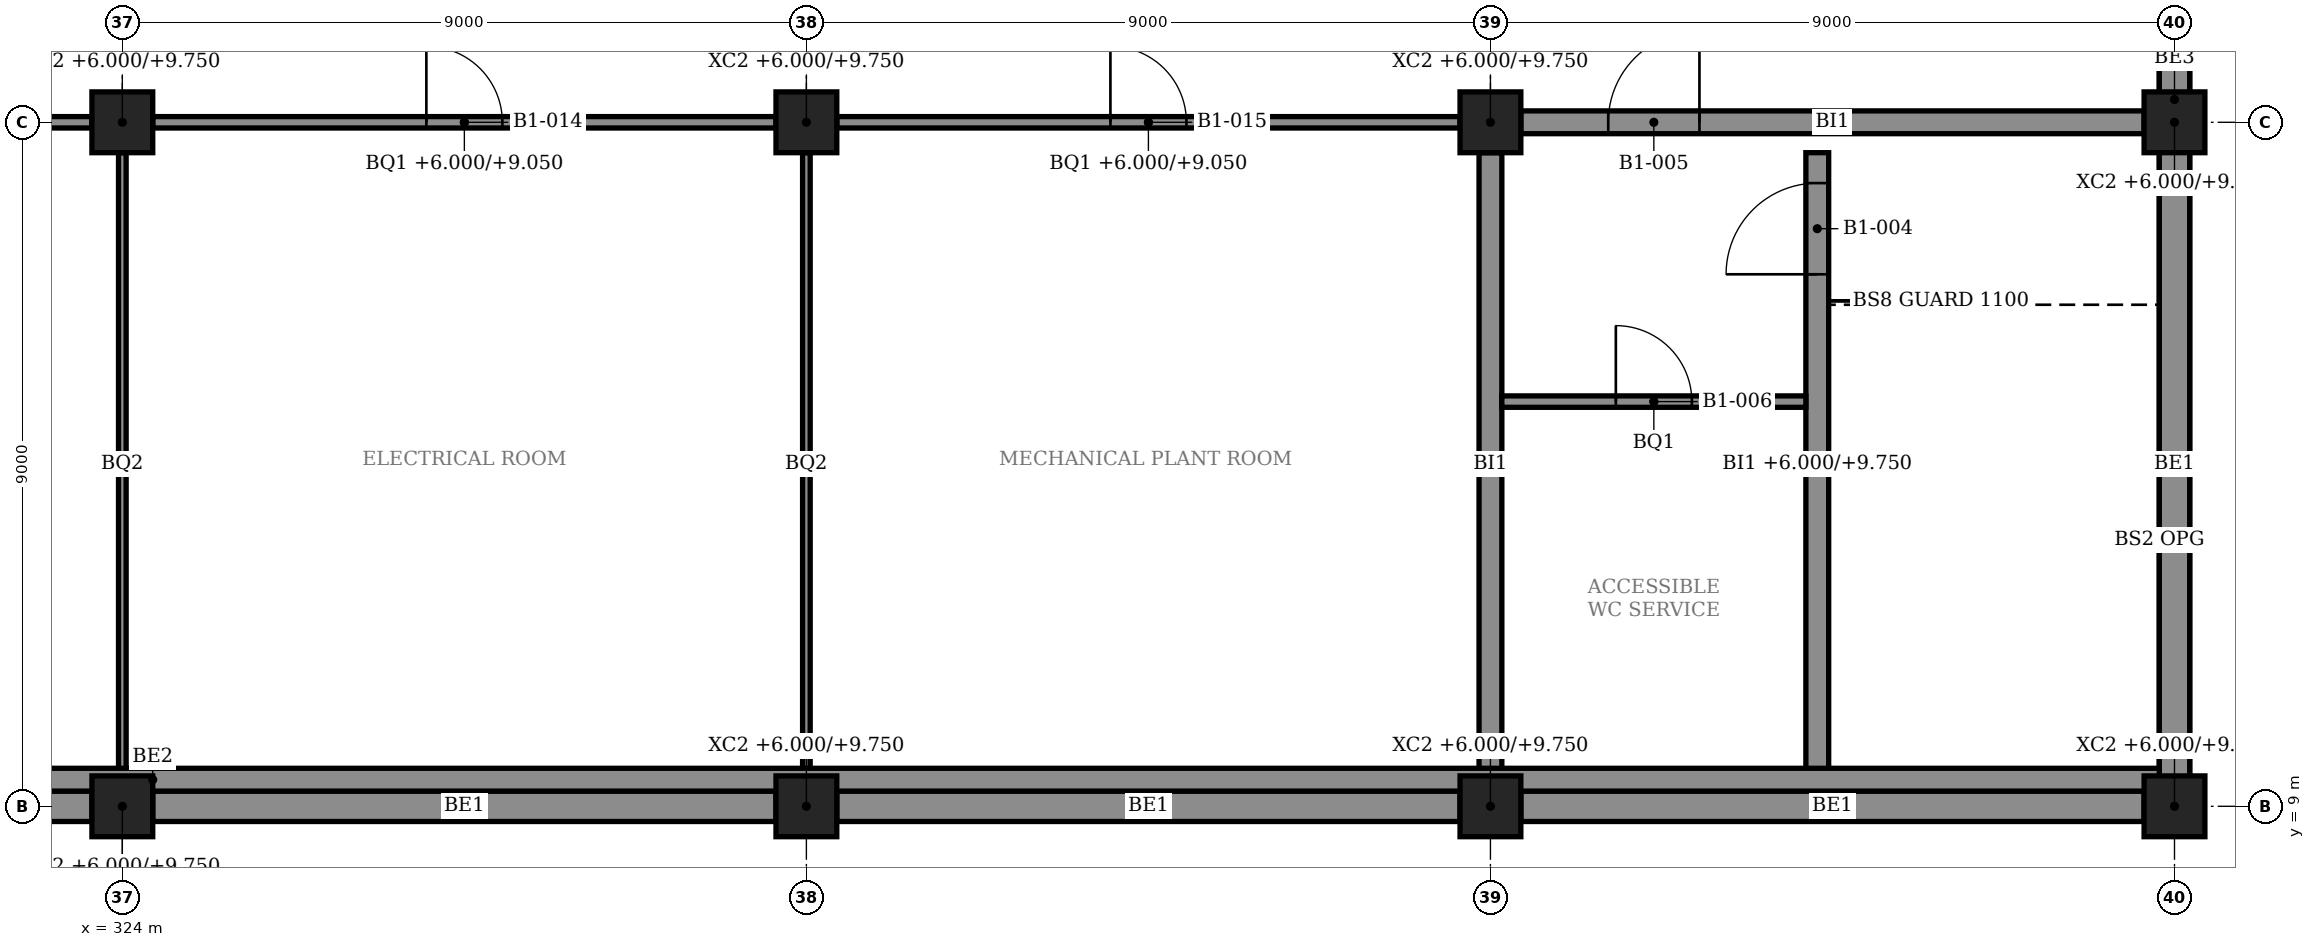
"""IFC4 building model, lengths in metres.
Left out: names, types, materials, properties, quantities, classifications, styles, units other than length and angle.
Written with IfcOpenShell. Run it as: python <this file> out.ifc"""

import sys

from ifc_helpers import new_model, si_unit, direction, frame, frame_2d, origin, origin_2d, place, context, subcontext, project, spatial, rectangle, extrude, element, fill, save


model = new_model("IFC4")
c1 = context("Model", 3, precision=1e-05, world=origin(), true_north=direction((0.0, 1.0)))
c2 = subcontext(c1, "Body", "Model", "MODEL_VIEW")
j1 = project(units=[si_unit("LENGTHUNIT", "METRE"), si_unit("PLANEANGLEUNIT", "RADIAN")], contexts=[c1])
p1 = place(None, origin())
s1 = spatial("IfcSite", under=j1, at=p1, CompositionType="ELEMENT")
p2 = place(p1, origin())
s2 = spatial("IfcBuilding", under=s1, at=p2, CompositionType="ELEMENT")
p3 = place(p2, frame((0.0, 0.0, 6.0)))
s3 = spatial("IfcBuildingStorey", under=s2, at=p3, CompositionType="ELEMENT", Elevation=6.0)
for number, where, z_axis, x_axis in (
    (1, (324.0, 9.0, 0.0), (0.0, 0.0, 1.0), (1.0, 0.0, 0.0)),
    (2, (333.0, 9.0, 0.0), (0.0, 0.0, 1.0), (1.0, 0.0, 0.0)),
    (3, (342.0, 9.0, 0.0), (0.0, 0.0, 1.0), (1.0, 0.0, 0.0)),
    (4, (351.0, 9.0, 0.0), (0.0, 0.0, 1.0), (1.0, 0.0, 0.0)),
    (5, (324.0, 18.0, 0.0), (0.0, 0.0, 1.0), (1.0, 0.0, 0.0)),
    (6, (333.0, 18.0, 0.0), (0.0, 0.0, 1.0), (1.0, 0.0, 0.0)),
    (7, (342.0, 18.0, 0.0), (0.0, 0.0, 1.0), (1.0, 0.0, 0.0)),
    (8, (351.0, 18.0, 0.0), (0.0, 0.0, 1.0), (1.0, 0.0, 0.0)),
):
    element("IfcColumn", number, at=place(p3, frame(where, z_axis=z_axis, x_axis=x_axis)), inside=s3, PredefinedType="COLUMN", context=c2, shape_type="SweptSolid", body=[
        extrude(rectangle(XDim=0.8, YDim=0.8, at=origin_2d()), origin(), (0.0, 0.0, 1.0), 3.75),
    ])
p4 = place(p3, frame((351.0, 9.4, 0.0), z_axis=(0.0, 0.0, 1.0), x_axis=(0.0, 1.0, 0.0)))
e9 = element("IfcWall", 9, at=p4, inside=s3, PredefinedType="STANDARD", context=c2, shape_type="SweptSolid", body=[
    extrude(rectangle(XDim=8.2, YDim=0.4, at=frame_2d((4.1, 0.0))), origin(), (0.0, 0.0, 1.0), 3.05),
])
p5 = place(p3, frame((351.0, 18.4, 0.0), z_axis=(0.0, 0.0, 1.0), x_axis=(0.0, 1.0, 0.0)))
e10 = element("IfcWall", 10, at=p5, inside=s3, PredefinedType="STANDARD", context=c2, shape_type="SweptSolid", body=[
    extrude(rectangle(XDim=8.2, YDim=0.4, at=frame_2d((4.1, 0.0))), origin(), (0.0, 0.0, 1.0), 3.05),
])
p6 = place(p5, frame((1.05, 0.0, 0.9)))
e11 = element("IfcOpeningElement", 11, at=p6, cuts=e10, PredefinedType="OPENING", context=c2, shape_type="SweptSolid", body=[
    extrude(rectangle(XDim=1.5, YDim=1.8, at=frame_2d((0.75, 0.9))), frame((0.0, 0.21, 0.0), z_axis=(0.0, -1.0, 0.0), x_axis=(1.0, 0.0, 0.0)), (0.0, 0.0, 1.0), 0.42),
])
p7 = place(p5, frame((3.55, 0.0, 0.9)))
e12 = element("IfcOpeningElement", 12, at=p7, cuts=e10, PredefinedType="OPENING", context=c2, shape_type="SweptSolid", body=[
    extrude(rectangle(XDim=1.5, YDim=1.8, at=frame_2d((0.75, 0.9))), frame((0.0, 0.21, 0.0), z_axis=(0.0, -1.0, 0.0), x_axis=(1.0, 0.0, 0.0)), (0.0, 0.0, 1.0), 0.42),
])
p8 = place(p5, frame((6.05, 0.0, 0.9)))
e13 = element("IfcOpeningElement", 13, at=p8, cuts=e10, PredefinedType="OPENING", context=c2, shape_type="SweptSolid", body=[
    extrude(rectangle(XDim=1.5, YDim=1.8, at=frame_2d((0.75, 0.9))), frame((0.0, 0.21, 0.0), z_axis=(0.0, -1.0, 0.0), x_axis=(1.0, 0.0, 0.0)), (0.0, 0.0, 1.0), 0.42),
])
for number, where, z_axis, x_axis in (
    (14, (315.4, 9.0, 0.0), (0.0, 0.0, 1.0), (1.0, 0.0, 0.0)),
    (15, (324.4, 9.0, 0.0), (0.0, 0.0, 1.0), (1.0, 0.0, 0.0)),
    (16, (333.4, 9.0, 0.0), (0.0, 0.0, 1.0), (1.0, 0.0, 0.0)),
    (17, (342.4, 9.0, 0.0), (0.0, 0.0, 1.0), (1.0, 0.0, 0.0)),
):
    element("IfcWall", number, at=place(p3, frame(where, z_axis=z_axis, x_axis=x_axis)), inside=s3, PredefinedType="STANDARD", context=c2, shape_type="SweptSolid", body=[
        extrude(rectangle(XDim=8.2, YDim=0.4, at=frame_2d((4.1, 0.0))), origin(), (0.0, 0.0, 1.0), 3.05),
    ])
p9 = place(p3, frame((351.0, 9.2, 4.0), z_axis=(0.0, 0.0, 1.0), x_axis=(0.0, 1.0, 0.0)))
e18 = element("IfcWall", 18, at=p9, inside=s3, PredefinedType="PARAPET", context=c2, shape_type="SweptSolid", body=[
    extrude(rectangle(XDim=18.2, YDim=0.4, at=frame_2d((9.1, 0.0))), origin(), (0.0, 0.0, 1.0), 1.121),
])
p10 = place(p3, frame((288.2, 9.35, 4.0), z_axis=(0.0, 0.0, 1.0), x_axis=(1.0, 0.0, 0.0)))
e19 = element("IfcWall", 19, at=p10, inside=s3, PredefinedType="PARAPET", context=c2, shape_type="SweptSolid", body=[
    extrude(rectangle(XDim=62.6, YDim=0.3, at=frame_2d((31.3, 0.0))), origin(), (0.0, 0.0, 1.0), 1.121),
])
p11 = place(p3, frame((346.3, 9.4, 0.0), z_axis=(0.0, 0.0, 1.0), x_axis=(0.0, 1.0, 0.0)))
e20 = element("IfcWall", 20, at=p11, inside=s3, PredefinedType="STANDARD", context=c2, shape_type="SweptSolid", body=[
    extrude(rectangle(XDim=8.2, YDim=0.3, at=frame_2d((4.1, 0.0))), origin(), (0.0, 0.0, 1.0), 3.75),
])
p12 = place(p11, frame((6.6, 0.0, 0.0)))
e21 = element("IfcOpeningElement", 21, at=p12, cuts=e20, PredefinedType="OPENING", context=c2, shape_type="SweptSolid", body=[
    extrude(rectangle(XDim=1.2, YDim=2.4, at=frame_2d((0.6, 1.2))), frame((0.0, 0.16, 0.0), z_axis=(0.0, -1.0, 0.0), x_axis=(1.0, 0.0, 0.0)), (0.0, 0.0, 1.0), 0.32),
])
p13 = place(p3, frame((342.0, 9.4, 0.0), z_axis=(0.0, 0.0, 1.0), x_axis=(0.0, 1.0, 0.0)))
e22 = element("IfcWall", 22, at=p13, inside=s3, PredefinedType="STANDARD", context=c2, shape_type="SweptSolid", body=[
    extrude(rectangle(XDim=8.2, YDim=0.3, at=frame_2d((4.1, 0.0))), origin(), (0.0, 0.0, 1.0), 3.05),
])
p14 = place(p3, frame((342.4, 18.0, 0.0), z_axis=(0.0, 0.0, 1.0), x_axis=(1.0, 0.0, 0.0)))
e23 = element("IfcWall", 23, at=p14, inside=s3, PredefinedType="STANDARD", context=c2, shape_type="SweptSolid", body=[
    extrude(rectangle(XDim=8.2, YDim=0.3, at=frame_2d((4.1, 0.0))), origin(), (0.0, 0.0, 1.0), 3.05),
])
p15 = place(p14, frame((1.15, 0.0, 0.0)))
e24 = element("IfcOpeningElement", 24, at=p15, cuts=e23, PredefinedType="OPENING", context=c2, shape_type="SweptSolid", body=[
    extrude(rectangle(XDim=1.2, YDim=2.4, at=frame_2d((0.6, 1.2))), frame((0.0, 0.16, 0.0), z_axis=(0.0, -1.0, 0.0), x_axis=(1.0, 0.0, 0.0)), (0.0, 0.0, 1.0), 0.32),
])
p16 = place(p3, frame((342.15, 14.325, 0.0), z_axis=(0.0, 0.0, 1.0), x_axis=(1.0, 0.0, 0.0)))
e25 = element("IfcWall", 25, at=p16, inside=s3, PredefinedType="PARTITIONING", context=c2, shape_type="SweptSolid", body=[
    extrude(rectangle(XDim=4.0, YDim=0.15, at=frame_2d((2.0, 0.0))), origin(), (0.0, 0.0, 1.0), 3.75),
])
p17 = place(p16, frame((1.5, 0.0, 0.0)))
e26 = element("IfcOpeningElement", 26, at=p17, cuts=e25, PredefinedType="OPENING", context=c2, shape_type="SweptSolid", body=[
    extrude(rectangle(XDim=1.0, YDim=2.4, at=frame_2d((0.5, 1.2))), frame((0.0, 0.085, 0.0), z_axis=(0.0, -1.0, 0.0), x_axis=(1.0, 0.0, 0.0)), (0.0, 0.0, 1.0), 0.17),
])
p18 = place(p3, frame((315.4, 18.0, 0.0), z_axis=(0.0, 0.0, 1.0), x_axis=(1.0, 0.0, 0.0)))
e27 = element("IfcWall", 27, at=p18, inside=s3, PredefinedType="PARTITIONING", context=c2, shape_type="SweptSolid", body=[
    extrude(rectangle(XDim=8.2, YDim=0.15, at=frame_2d((4.1, 0.0))), origin(), (0.0, 0.0, 1.0), 3.05),
])
p19 = place(p3, frame((324.4, 18.0, 0.0), z_axis=(0.0, 0.0, 1.0), x_axis=(1.0, 0.0, 0.0)))
e28 = element("IfcWall", 28, at=p19, inside=s3, PredefinedType="PARTITIONING", context=c2, shape_type="SweptSolid", body=[
    extrude(rectangle(XDim=8.2, YDim=0.15, at=frame_2d((4.1, 0.0))), origin(), (0.0, 0.0, 1.0), 3.05),
])
p20 = place(p19, frame((3.6, 0.0, 0.0)))
e29 = element("IfcOpeningElement", 29, at=p20, cuts=e28, PredefinedType="OPENING", context=c2, shape_type="SweptSolid", body=[
    extrude(rectangle(XDim=1.0, YDim=2.4, at=frame_2d((0.5, 1.2))), frame((0.0, 0.085, 0.0), z_axis=(0.0, -1.0, 0.0), x_axis=(1.0, 0.0, 0.0)), (0.0, 0.0, 1.0), 0.17),
])
p21 = place(p3, frame((333.4, 18.0, 0.0), z_axis=(0.0, 0.0, 1.0), x_axis=(1.0, 0.0, 0.0)))
e30 = element("IfcWall", 30, at=p21, inside=s3, PredefinedType="PARTITIONING", context=c2, shape_type="SweptSolid", body=[
    extrude(rectangle(XDim=8.2, YDim=0.15, at=frame_2d((4.1, 0.0))), origin(), (0.0, 0.0, 1.0), 3.05),
])
p22 = place(p21, frame((3.6, 0.0, 0.0)))
e31 = element("IfcOpeningElement", 31, at=p22, cuts=e30, PredefinedType="OPENING", context=c2, shape_type="SweptSolid", body=[
    extrude(rectangle(XDim=1.0, YDim=2.4, at=frame_2d((0.5, 1.2))), frame((0.0, 0.085, 0.0), z_axis=(0.0, -1.0, 0.0), x_axis=(1.0, 0.0, 0.0)), (0.0, 0.0, 1.0), 0.17),
])
for number, where, z_axis, x_axis in (
    (32, (324.0, 9.4, 0.0), (0.0, 0.0, 1.0), (0.0, 1.0, 0.0)),
    (33, (333.0, 9.4, 0.0), (0.0, 0.0, 1.0), (0.0, 1.0, 0.0)),
):
    element("IfcWall", number, at=place(p3, frame(where, z_axis=z_axis, x_axis=x_axis)), inside=s3, PredefinedType="PARTITIONING", context=c2, shape_type="SweptSolid", body=[
        extrude(rectangle(XDim=8.2, YDim=0.1, at=frame_2d((4.1, 0.0))), origin(), (0.0, 0.0, 1.0), 3.05),
    ])
p23 = place(p12, origin())
e34 = element("IfcDoor", 34, at=p23, inside=s3, OperationType="SINGLE_SWING_LEFT", PredefinedType="DOOR", context=c2, shape_type="SweptSolid", body=[
    extrude(rectangle(XDim=1.2, YDim=2.4, at=frame_2d((0.6, 1.2))), frame((0.0, 0.025, 0.0), z_axis=(0.0, -1.0, 0.0), x_axis=(1.0, 0.0, 0.0)), (0.0, 0.0, 1.0), 0.05),
])
fill(e21, e34)
p24 = place(p15, origin())
e35 = element("IfcDoor", 35, at=p24, inside=s3, OperationType="SINGLE_SWING_RIGHT", PredefinedType="DOOR", context=c2, shape_type="SweptSolid", body=[
    extrude(rectangle(XDim=1.2, YDim=2.4, at=frame_2d((0.6, 1.2))), frame((0.0, 0.025, 0.0), z_axis=(0.0, -1.0, 0.0), x_axis=(1.0, 0.0, 0.0)), (0.0, 0.0, 1.0), 0.05),
])
fill(e24, e35)
p25 = place(p17, origin())
e36 = element("IfcDoor", 36, at=p25, inside=s3, OperationType="SINGLE_SWING_LEFT", PredefinedType="DOOR", context=c2, shape_type="SweptSolid", body=[
    extrude(rectangle(XDim=1.0, YDim=2.4, at=frame_2d((0.5, 1.2))), frame((0.0, 0.025, 0.0), z_axis=(0.0, -1.0, 0.0), x_axis=(1.0, 0.0, 0.0)), (0.0, 0.0, 1.0), 0.05),
])
fill(e26, e36)
p26 = place(p20, origin())
e37 = element("IfcDoor", 37, at=p26, inside=s3, OperationType="SINGLE_SWING_LEFT", PredefinedType="DOOR", context=c2, shape_type="SweptSolid", body=[
    extrude(rectangle(XDim=1.0, YDim=2.4, at=frame_2d((0.5, 1.2))), frame((0.0, 0.025, 0.0), z_axis=(0.0, -1.0, 0.0), x_axis=(1.0, 0.0, 0.0)), (0.0, 0.0, 1.0), 0.05),
])
fill(e29, e37)
p27 = place(p22, origin())
e38 = element("IfcDoor", 38, at=p27, inside=s3, OperationType="SINGLE_SWING_LEFT", PredefinedType="DOOR", context=c2, shape_type="SweptSolid", body=[
    extrude(rectangle(XDim=1.0, YDim=2.4, at=frame_2d((0.5, 1.2))), frame((0.0, 0.025, 0.0), z_axis=(0.0, -1.0, 0.0), x_axis=(1.0, 0.0, 0.0)), (0.0, 0.0, 1.0), 0.05),
])
fill(e31, e38)
save(model, sys.argv[1])
